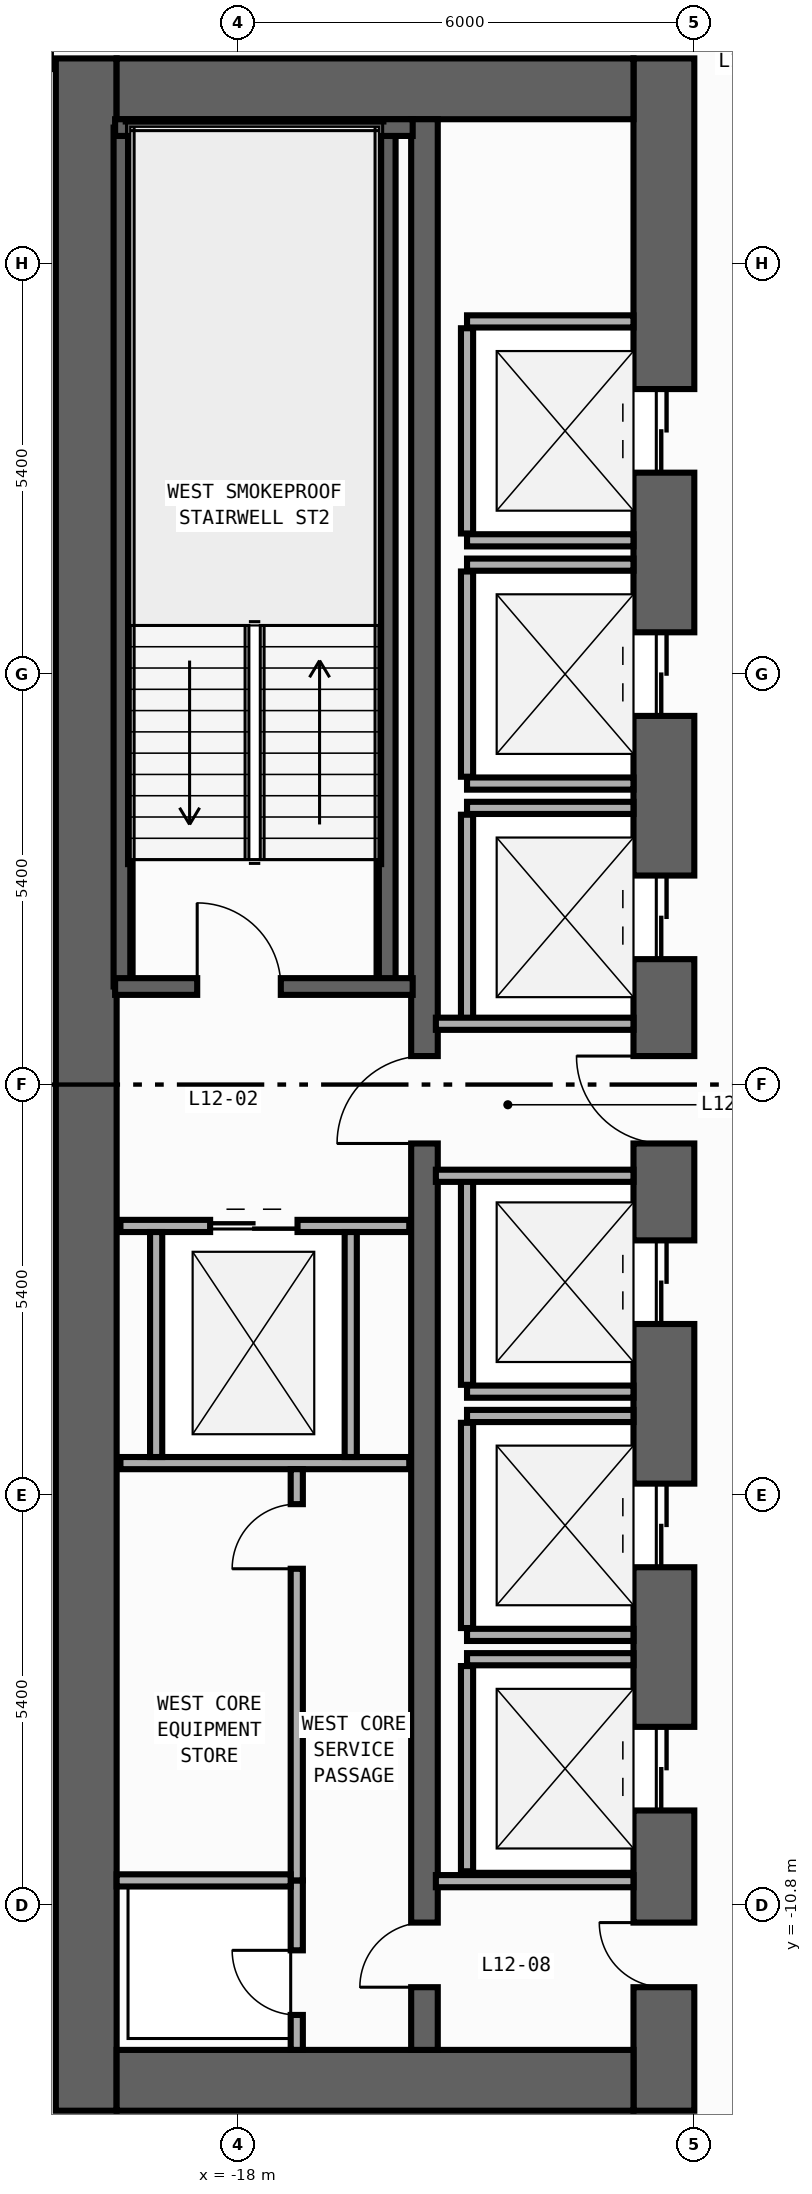
"""IFC4 building model, lengths in metres.
Left out: names, types, materials, properties, quantities, classifications, styles, units other than length and angle.
Written with IfcOpenShell. Run it as: python <this file> out.ifc"""

import sys

from ifc_helpers import new_model, si_unit, direction, frame, frame_2d, origin, place, context, subcontext, project, spatial, rectangle, extrude, element, fill, save


model = new_model("IFC4")
c1 = context("Model", 3, precision=1e-05, world=origin(), true_north=direction((0.0, 1.0)))
c2 = subcontext(c1, "Body", "Model", "MODEL_VIEW")
j1 = project(units=[si_unit("LENGTHUNIT", "METRE"), si_unit("PLANEANGLEUNIT", "RADIAN")], contexts=[c1])
p1 = place(None, origin())
s1 = spatial("IfcSite", under=j1, at=p1, CompositionType="ELEMENT")
p2 = place(p1, origin())
s2 = spatial("IfcBuilding", under=s1, at=p2, CompositionType="ELEMENT")
p3 = place(p2, frame((0.0, 0.0, 51.2)))
s3 = spatial("IfcBuildingStorey", under=s2, at=p3, CompositionType="ELEMENT", Elevation=51.2)
p4 = place(p3, frame((-20.0, -13.5, 0.0), z_axis=(0.0, 0.0, 1.0), x_axis=(0.0, 1.0, 0.0)))
e1 = element("IfcWall", 1, at=p4, inside=s3, PredefinedType="SHEAR", context=c2, shape_type="SweptSolid", body=[
    extrude(rectangle(XDim=27.0, YDim=0.8, at=frame_2d((13.5, 0.0))), origin(), (0.0, 0.0, 1.0), 3.94),
])
p5 = place(p3, frame((-12.4, -13.5, 0.0), z_axis=(0.0, 0.0, 1.0), x_axis=(0.0, 1.0, 0.0)))
e2 = element("IfcWall", 2, at=p5, inside=s3, PredefinedType="SHEAR", context=c2, shape_type="SweptSolid", body=[
    extrude(rectangle(XDim=27.0, YDim=0.8, at=frame_2d((13.5, 0.0))), origin(), (0.0, 0.0, 1.0), 3.94),
])
p6 = place(p5, frame((21.55, 0.0, 0.0)))
e3 = element("IfcOpeningElement", 3, at=p6, cuts=e2, PredefinedType="OPENING", context=c2, shape_type="SweptSolid", body=[
    extrude(rectangle(XDim=1.1, YDim=2.2, at=frame_2d((0.55, 1.1))), frame((0.0, 0.41, 0.0), z_axis=(0.0, -1.0, 0.0), x_axis=(1.0, 0.0, 0.0)), (0.0, 0.0, 1.0), 0.82),
])
p7 = place(p5, frame((18.35, 0.0, 0.0)))
e4 = element("IfcOpeningElement", 4, at=p7, cuts=e2, PredefinedType="OPENING", context=c2, shape_type="SweptSolid", body=[
    extrude(rectangle(XDim=1.1, YDim=2.2, at=frame_2d((0.55, 1.1))), frame((0.0, 0.41, 0.0), z_axis=(0.0, -1.0, 0.0), x_axis=(1.0, 0.0, 0.0)), (0.0, 0.0, 1.0), 0.82),
])
p8 = place(p5, frame((15.15, 0.0, 0.0)))
e5 = element("IfcOpeningElement", 5, at=p8, cuts=e2, PredefinedType="OPENING", context=c2, shape_type="SweptSolid", body=[
    extrude(rectangle(XDim=1.1, YDim=2.2, at=frame_2d((0.55, 1.1))), frame((0.0, 0.41, 0.0), z_axis=(0.0, -1.0, 0.0), x_axis=(1.0, 0.0, 0.0)), (0.0, 0.0, 1.0), 0.82),
])
p9 = place(p5, frame((10.35, 0.0, 0.0)))
e6 = element("IfcOpeningElement", 6, at=p9, cuts=e2, PredefinedType="OPENING", context=c2, shape_type="SweptSolid", body=[
    extrude(rectangle(XDim=1.1, YDim=2.2, at=frame_2d((0.55, 1.1))), frame((0.0, 0.41, 0.0), z_axis=(0.0, -1.0, 0.0), x_axis=(1.0, 0.0, 0.0)), (0.0, 0.0, 1.0), 0.82),
])
p10 = place(p5, frame((7.15, 0.0, 0.0)))
e7 = element("IfcOpeningElement", 7, at=p10, cuts=e2, PredefinedType="OPENING", context=c2, shape_type="SweptSolid", body=[
    extrude(rectangle(XDim=1.1, YDim=2.2, at=frame_2d((0.55, 1.1))), frame((0.0, 0.41, 0.0), z_axis=(0.0, -1.0, 0.0), x_axis=(1.0, 0.0, 0.0)), (0.0, 0.0, 1.0), 0.82),
])
p11 = place(p5, frame((3.95, 0.0, 0.0)))
e8 = element("IfcOpeningElement", 8, at=p11, cuts=e2, PredefinedType="OPENING", context=c2, shape_type="SweptSolid", body=[
    extrude(rectangle(XDim=1.1, YDim=2.2, at=frame_2d((0.55, 1.1))), frame((0.0, 0.41, 0.0), z_axis=(0.0, -1.0, 0.0), x_axis=(1.0, 0.0, 0.0)), (0.0, 0.0, 1.0), 0.82),
])
p12 = place(p5, frame((12.725, 0.0, 0.0)))
e9 = element("IfcOpeningElement", 9, at=p12, cuts=e2, PredefinedType="OPENING", context=c2, shape_type="SweptSolid", body=[
    extrude(rectangle(XDim=1.15, YDim=2.2, at=frame_2d((0.575, 1.1))), frame((0.0, 0.41, 0.0), z_axis=(0.0, -1.0, 0.0), x_axis=(1.0, 0.0, 0.0)), (0.0, 0.0, 1.0), 0.82),
])
p13 = place(p5, frame((1.625, 0.0, 0.0)))
e10 = element("IfcOpeningElement", 10, at=p13, cuts=e2, PredefinedType="OPENING", context=c2, shape_type="SweptSolid", body=[
    extrude(rectangle(XDim=0.85, YDim=2.1, at=frame_2d((0.425, 1.05))), frame((0.0, 0.41, 0.0), z_axis=(0.0, -1.0, 0.0), x_axis=(1.0, 0.0, 0.0)), (0.0, 0.0, 1.0), 0.82),
])
for number, where, z_axis, x_axis in (
    (11, (-19.6, -13.1, 0.0), (0.0, 0.0, 1.0), (1.0, 0.0, 0.0)),
    (12, (-19.6, 13.1, 0.0), (0.0, 0.0, 1.0), (1.0, 0.0, 0.0)),
):
    element("IfcWall", number, at=place(p3, frame(where, z_axis=z_axis, x_axis=x_axis)), inside=s3, PredefinedType="SHEAR", context=c2, shape_type="SweptSolid", body=[
        extrude(rectangle(XDim=6.8, YDim=0.8, at=frame_2d((3.4, 0.0))), origin(), (0.0, 0.0, 1.0), 3.94),
    ])
p14 = place(p3, frame((-15.55, -12.7, 0.0), z_axis=(0.0, 0.0, 1.0), x_axis=(0.0, 1.0, 0.0)))
e13 = element("IfcWall", 13, at=p14, inside=s3, PredefinedType="SHEAR", context=c2, shape_type="SweptSolid", body=[
    extrude(rectangle(XDim=25.4, YDim=0.35, at=frame_2d((12.7, 0.0))), origin(), (0.0, 0.0, 1.0), 3.94),
])
p15 = place(p14, frame((11.925, 0.0, 0.0)))
e14 = element("IfcOpeningElement", 14, at=p15, cuts=e13, PredefinedType="OPENING", context=c2, shape_type="SweptSolid", body=[
    extrude(rectangle(XDim=1.15, YDim=2.2, at=frame_2d((0.575, 1.1))), frame((0.0, 0.185, 0.0), z_axis=(0.0, -1.0, 0.0), x_axis=(1.0, 0.0, 0.0)), (0.0, 0.0, 1.0), 0.37),
])
p16 = place(p14, frame((0.825, 0.0, 0.0)))
e15 = element("IfcOpeningElement", 15, at=p16, cuts=e13, PredefinedType="OPENING", context=c2, shape_type="SweptSolid", body=[
    extrude(rectangle(XDim=0.85, YDim=2.1, at=frame_2d((0.425, 1.05))), frame((0.0, 0.185, 0.0), z_axis=(0.0, -1.0, 0.0), x_axis=(1.0, 0.0, 0.0)), (0.0, 0.0, 1.0), 0.37),
])
for number, where, z_axis, x_axis in (
    (16, (-16.04, 1.29, 0.0), (0.0, 0.0, 1.0), (0.0, 1.0, 0.0)),
    (17, (-19.53, 1.29, 0.0), (0.0, 0.0, 1.0), (0.0, 1.0, 0.0)),
):
    element("IfcWall", number, at=place(p3, frame(where, z_axis=z_axis, x_axis=x_axis)), inside=s3, PredefinedType="SHEAR", context=c2, shape_type="SweptSolid", body=[
        extrude(rectangle(XDim=11.3, YDim=0.22, at=frame_2d((5.65, 0.0))), origin(), (0.0, 0.0, 1.0), 3.94),
    ])
p17 = place(p3, frame((-19.62, 12.59, 0.0), z_axis=(0.0, 0.0, 1.0), x_axis=(1.0, 0.0, 0.0)))
e18 = element("IfcWall", 18, at=p17, inside=s3, PredefinedType="SHEAR", context=c2, shape_type="SweptSolid", body=[
    extrude(rectangle(XDim=3.915, YDim=0.22, at=frame_2d((1.958, 0.0))), origin(), (0.0, 0.0, 1.0), 3.94),
])
p18 = place(p3, frame((-19.62, 1.29, 0.0), z_axis=(0.0, 0.0, 1.0), x_axis=(1.0, 0.0, 0.0)))
e19 = element("IfcWall", 19, at=p18, inside=s3, PredefinedType="SHEAR", context=c2, shape_type="SweptSolid", body=[
    extrude(rectangle(XDim=3.915, YDim=0.22, at=frame_2d((1.958, 0.0))), origin(), (0.0, 0.0, 1.0), 3.94),
])
p19 = place(p18, frame((1.08, 0.0, 0.0)))
e20 = element("IfcOpeningElement", 20, at=p19, cuts=e19, PredefinedType="OPENING", context=c2, shape_type="SweptSolid", body=[
    extrude(rectangle(XDim=1.1, YDim=2.2, at=frame_2d((0.55, 1.1))), frame((0.0, 0.12, 0.0), z_axis=(0.0, -1.0, 0.0), x_axis=(1.0, 0.0, 0.0)), (0.0, 0.0, 1.0), 0.24),
])
for number, where, z_axis, x_axis in (
    (21, (-14.99, 7.16, 0.0), (0.0, 0.0, 1.0), (1.0, 0.0, 0.0)),
    (22, (-14.99, 10.04, 0.0), (0.0, 0.0, 1.0), (1.0, 0.0, 0.0)),
):
    element("IfcWall", number, at=place(p3, frame(where, z_axis=z_axis, x_axis=x_axis)), inside=s3, PredefinedType="STANDARD", context=c2, shape_type="SweptSolid", body=[
        extrude(rectangle(XDim=2.19, YDim=0.16, at=frame_2d((1.095, 0.0))), origin(), (0.0, 0.0, 1.0), 3.94),
    ])
p20 = place(p3, frame((-14.99, 7.25, 0.0), z_axis=(0.0, 0.0, 1.0), x_axis=(0.0, 1.0, 0.0)))
e23 = element("IfcWall", 23, at=p20, inside=s3, PredefinedType="STANDARD", context=c2, shape_type="SweptSolid", body=[
    extrude(rectangle(XDim=2.7, YDim=0.16, at=frame_2d((1.35, 0.0))), origin(), (0.0, 0.0, 1.0), 3.94),
])
for number, where, z_axis, x_axis in (
    (24, (-14.99, 3.96, 0.0), (0.0, 0.0, 1.0), (1.0, 0.0, 0.0)),
    (25, (-14.99, 6.84, 0.0), (0.0, 0.0, 1.0), (1.0, 0.0, 0.0)),
):
    element("IfcWall", number, at=place(p3, frame(where, z_axis=z_axis, x_axis=x_axis)), inside=s3, PredefinedType="STANDARD", context=c2, shape_type="SweptSolid", body=[
        extrude(rectangle(XDim=2.19, YDim=0.16, at=frame_2d((1.095, 0.0))), origin(), (0.0, 0.0, 1.0), 3.94),
    ])
p21 = place(p3, frame((-14.99, 4.05, 0.0), z_axis=(0.0, 0.0, 1.0), x_axis=(0.0, 1.0, 0.0)))
e26 = element("IfcWall", 26, at=p21, inside=s3, PredefinedType="STANDARD", context=c2, shape_type="SweptSolid", body=[
    extrude(rectangle(XDim=2.7, YDim=0.16, at=frame_2d((1.35, 0.0))), origin(), (0.0, 0.0, 1.0), 3.94),
])
p22 = place(p3, frame((-14.99, 3.64, 0.0), z_axis=(0.0, 0.0, 1.0), x_axis=(1.0, 0.0, 0.0)))
e27 = element("IfcWall", 27, at=p22, inside=s3, PredefinedType="STANDARD", context=c2, shape_type="SweptSolid", body=[
    extrude(rectangle(XDim=2.19, YDim=0.16, at=frame_2d((1.095, 0.0))), origin(), (0.0, 0.0, 1.0), 3.94),
])
p23 = place(p3, frame((-14.99, 0.85, 0.0), z_axis=(0.0, 0.0, 1.0), x_axis=(0.0, 1.0, 0.0)))
e28 = element("IfcWall", 28, at=p23, inside=s3, PredefinedType="STANDARD", context=c2, shape_type="SweptSolid", body=[
    extrude(rectangle(XDim=2.7, YDim=0.16, at=frame_2d((1.35, 0.0))), origin(), (0.0, 0.0, 1.0), 3.94),
])
p24 = place(p3, frame((-14.99, -4.04, 0.0), z_axis=(0.0, 0.0, 1.0), x_axis=(1.0, 0.0, 0.0)))
e29 = element("IfcWall", 29, at=p24, inside=s3, PredefinedType="STANDARD", context=c2, shape_type="SweptSolid", body=[
    extrude(rectangle(XDim=2.19, YDim=0.16, at=frame_2d((1.095, 0.0))), origin(), (0.0, 0.0, 1.0), 3.94),
])
p25 = place(p3, frame((-14.99, -3.95, 0.0), z_axis=(0.0, 0.0, 1.0), x_axis=(0.0, 1.0, 0.0)))
e30 = element("IfcWall", 30, at=p25, inside=s3, PredefinedType="STANDARD", context=c2, shape_type="SweptSolid", body=[
    extrude(rectangle(XDim=2.7, YDim=0.16, at=frame_2d((1.35, 0.0))), origin(), (0.0, 0.0, 1.0), 3.94),
])
for number, where, z_axis, x_axis in (
    (31, (-14.99, -7.24, 0.0), (0.0, 0.0, 1.0), (1.0, 0.0, 0.0)),
    (32, (-14.99, -4.36, 0.0), (0.0, 0.0, 1.0), (1.0, 0.0, 0.0)),
):
    element("IfcWall", number, at=place(p3, frame(where, z_axis=z_axis, x_axis=x_axis)), inside=s3, PredefinedType="STANDARD", context=c2, shape_type="SweptSolid", body=[
        extrude(rectangle(XDim=2.19, YDim=0.16, at=frame_2d((1.095, 0.0))), origin(), (0.0, 0.0, 1.0), 3.94),
    ])
p26 = place(p3, frame((-14.99, -7.15, 0.0), z_axis=(0.0, 0.0, 1.0), x_axis=(0.0, 1.0, 0.0)))
e33 = element("IfcWall", 33, at=p26, inside=s3, PredefinedType="STANDARD", context=c2, shape_type="SweptSolid", body=[
    extrude(rectangle(XDim=2.7, YDim=0.16, at=frame_2d((1.35, 0.0))), origin(), (0.0, 0.0, 1.0), 3.94),
])
p27 = place(p3, frame((-14.99, -7.56, 0.0), z_axis=(0.0, 0.0, 1.0), x_axis=(1.0, 0.0, 0.0)))
e34 = element("IfcWall", 34, at=p27, inside=s3, PredefinedType="STANDARD", context=c2, shape_type="SweptSolid", body=[
    extrude(rectangle(XDim=2.19, YDim=0.16, at=frame_2d((1.095, 0.0))), origin(), (0.0, 0.0, 1.0), 3.94),
])
p28 = place(p3, frame((-14.99, -10.35, 0.0), z_axis=(0.0, 0.0, 1.0), x_axis=(0.0, 1.0, 0.0)))
e35 = element("IfcWall", 35, at=p28, inside=s3, PredefinedType="STANDARD", context=c2, shape_type="SweptSolid", body=[
    extrude(rectangle(XDim=2.7, YDim=0.16, at=frame_2d((1.35, 0.0))), origin(), (0.0, 0.0, 1.0), 3.94),
])
p29 = place(p3, frame((-19.55, -1.86, 0.0), z_axis=(0.0, 0.0, 1.0), x_axis=(1.0, 0.0, 0.0)))
e36 = element("IfcWall", 36, at=p29, inside=s3, PredefinedType="STANDARD", context=c2, shape_type="SweptSolid", body=[
    extrude(rectangle(XDim=3.8, YDim=0.16, at=frame_2d((1.9, 0.0))), origin(), (0.0, 0.0, 1.0), 3.94),
])
p30 = place(p29, frame((1.18, 0.0, 0.0)))
e37 = element("IfcOpeningElement", 37, at=p30, cuts=e36, PredefinedType="OPENING", context=c2, shape_type="SweptSolid", body=[
    extrude(rectangle(XDim=1.15, YDim=2.2, at=frame_2d((0.575, 1.1))), frame((0.0, 0.09, 0.0), z_axis=(0.0, -1.0, 0.0), x_axis=(1.0, 0.0, 0.0)), (0.0, 0.0, 1.0), 0.18),
])
p31 = place(p3, frame((-19.55, -4.98, 0.0), z_axis=(0.0, 0.0, 1.0), x_axis=(1.0, 0.0, 0.0)))
e38 = element("IfcWall", 38, at=p31, inside=s3, PredefinedType="STANDARD", context=c2, shape_type="SweptSolid", body=[
    extrude(rectangle(XDim=3.8, YDim=0.16, at=frame_2d((1.9, 0.0))), origin(), (0.0, 0.0, 1.0), 3.94),
])
for number, where, z_axis, x_axis in (
    (39, (-19.08, -4.9, 0.0), (0.0, 0.0, 1.0), (0.0, 1.0, 0.0)),
    (40, (-16.52, -4.9, 0.0), (0.0, 0.0, 1.0), (0.0, 1.0, 0.0)),
):
    element("IfcWall", number, at=place(p3, frame(where, z_axis=z_axis, x_axis=x_axis)), inside=s3, PredefinedType="STANDARD", context=c2, shape_type="SweptSolid", body=[
        extrude(rectangle(XDim=2.96, YDim=0.16, at=frame_2d((1.48, 0.0))), origin(), (0.0, 0.0, 1.0), 3.94),
    ])
for number, where, z_axis, x_axis in (
    (41, (-15.4, 0.8, 0.0), (0.0, 0.0, 1.0), (1.0, 0.0, 0.0)),
    (42, (-15.4, -1.2, 0.0), (0.0, 0.0, 1.0), (1.0, 0.0, 0.0)),
    (43, (-15.4, -10.48, 0.0), (0.0, 0.0, 1.0), (1.0, 0.0, 0.0)),
):
    element("IfcWall", number, at=place(p3, frame(where, z_axis=z_axis, x_axis=x_axis)), inside=s3, PredefinedType="STANDARD", context=c2, shape_type="SweptSolid", body=[
        extrude(rectangle(XDim=2.6, YDim=0.16, at=frame_2d((1.3, 0.0))), origin(), (0.0, 0.0, 1.0), 3.94),
    ])
p32 = place(p3, frame((-17.23, -12.7, 0.0), z_axis=(0.0, 0.0, 1.0), x_axis=(0.0, 1.0, 0.0)))
e44 = element("IfcWall", 44, at=p32, inside=s3, PredefinedType="PARTITIONING", context=c2, shape_type="SweptSolid", body=[
    extrude(rectangle(XDim=2.23, YDim=0.16, at=frame_2d((1.115, 0.0))), origin(), (0.0, 0.0, 1.0), 3.94),
])
p33 = place(p32, frame((0.46, 0.0, 0.0)))
e45 = element("IfcOpeningElement", 45, at=p33, cuts=e44, PredefinedType="OPENING", context=c2, shape_type="SweptSolid", body=[
    extrude(rectangle(XDim=0.85, YDim=2.1, at=frame_2d((0.425, 1.05))), frame((0.0, 0.09, 0.0), z_axis=(0.0, -1.0, 0.0), x_axis=(1.0, 0.0, 0.0)), (0.0, 0.0, 1.0), 0.18),
])
p34 = place(p3, frame((-17.23, -10.47, 0.0), z_axis=(0.0, 0.0, 1.0), x_axis=(0.0, 1.0, 0.0)))
e46 = element("IfcWall", 46, at=p34, inside=s3, PredefinedType="PARTITIONING", context=c2, shape_type="SweptSolid", body=[
    extrude(rectangle(XDim=5.41, YDim=0.16, at=frame_2d((2.705, 0.0))), origin(), (0.0, 0.0, 1.0), 3.94),
])
p35 = place(p34, frame((4.1, 0.0, 0.0)))
e47 = element("IfcOpeningElement", 47, at=p35, cuts=e46, PredefinedType="OPENING", context=c2, shape_type="SweptSolid", body=[
    extrude(rectangle(XDim=0.85, YDim=2.1, at=frame_2d((0.425, 1.05))), frame((0.0, 0.09, 0.0), z_axis=(0.0, -1.0, 0.0), x_axis=(1.0, 0.0, 0.0)), (0.0, 0.0, 1.0), 0.18),
])
p36 = place(p3, frame((-19.6, -10.47, 0.0), z_axis=(0.0, 0.0, 1.0), x_axis=(1.0, 0.0, 0.0)))
e48 = element("IfcWall", 48, at=p36, inside=s3, PredefinedType="PARTITIONING", context=c2, shape_type="SweptSolid", body=[
    extrude(rectangle(XDim=2.29, YDim=0.16, at=frame_2d((1.145, 0.0))), origin(), (0.0, 0.0, 1.0), 3.94),
])
p37 = place(p19, origin())
e49 = element("IfcDoor", 49, at=p37, inside=s3, OperationType="SINGLE_SWING_LEFT", PredefinedType="DOOR", context=c2, shape_type="SweptSolid", body=[
    extrude(rectangle(XDim=1.1, YDim=2.2, at=frame_2d((0.55, 1.1))), frame((0.0, 0.025, 0.0), z_axis=(0.0, -1.0, 0.0), x_axis=(1.0, 0.0, 0.0)), (0.0, 0.0, 1.0), 0.05),
])
fill(e20, e49)
p38 = place(p6, origin())
e50 = element("IfcDoor", 50, at=p38, inside=s3, OperationType="DOUBLE_DOOR_SLIDING", PredefinedType="DOOR", context=c2, shape_type="SweptSolid", body=[
    extrude(rectangle(XDim=1.1, YDim=2.2, at=frame_2d((0.55, 1.1))), frame((0.0, 0.025, 0.0), z_axis=(0.0, -1.0, 0.0), x_axis=(1.0, 0.0, 0.0)), (0.0, 0.0, 1.0), 0.05),
])
fill(e3, e50)
p39 = place(p7, origin())
e51 = element("IfcDoor", 51, at=p39, inside=s3, OperationType="DOUBLE_DOOR_SLIDING", PredefinedType="DOOR", context=c2, shape_type="SweptSolid", body=[
    extrude(rectangle(XDim=1.1, YDim=2.2, at=frame_2d((0.55, 1.1))), frame((0.0, 0.025, 0.0), z_axis=(0.0, -1.0, 0.0), x_axis=(1.0, 0.0, 0.0)), (0.0, 0.0, 1.0), 0.05),
])
fill(e4, e51)
p40 = place(p8, origin())
e52 = element("IfcDoor", 52, at=p40, inside=s3, OperationType="DOUBLE_DOOR_SLIDING", PredefinedType="DOOR", context=c2, shape_type="SweptSolid", body=[
    extrude(rectangle(XDim=1.1, YDim=2.2, at=frame_2d((0.55, 1.1))), frame((0.0, 0.025, 0.0), z_axis=(0.0, -1.0, 0.0), x_axis=(1.0, 0.0, 0.0)), (0.0, 0.0, 1.0), 0.05),
])
fill(e5, e52)
p41 = place(p9, origin())
e53 = element("IfcDoor", 53, at=p41, inside=s3, OperationType="DOUBLE_DOOR_SLIDING", PredefinedType="DOOR", context=c2, shape_type="SweptSolid", body=[
    extrude(rectangle(XDim=1.1, YDim=2.2, at=frame_2d((0.55, 1.1))), frame((0.0, 0.025, 0.0), z_axis=(0.0, -1.0, 0.0), x_axis=(1.0, 0.0, 0.0)), (0.0, 0.0, 1.0), 0.05),
])
fill(e6, e53)
p42 = place(p10, origin())
e54 = element("IfcDoor", 54, at=p42, inside=s3, OperationType="DOUBLE_DOOR_SLIDING", PredefinedType="DOOR", context=c2, shape_type="SweptSolid", body=[
    extrude(rectangle(XDim=1.1, YDim=2.2, at=frame_2d((0.55, 1.1))), frame((0.0, 0.025, 0.0), z_axis=(0.0, -1.0, 0.0), x_axis=(1.0, 0.0, 0.0)), (0.0, 0.0, 1.0), 0.05),
])
fill(e7, e54)
p43 = place(p11, origin())
e55 = element("IfcDoor", 55, at=p43, inside=s3, OperationType="DOUBLE_DOOR_SLIDING", PredefinedType="DOOR", context=c2, shape_type="SweptSolid", body=[
    extrude(rectangle(XDim=1.1, YDim=2.2, at=frame_2d((0.55, 1.1))), frame((0.0, 0.025, 0.0), z_axis=(0.0, -1.0, 0.0), x_axis=(1.0, 0.0, 0.0)), (0.0, 0.0, 1.0), 0.05),
])
fill(e8, e55)
p44 = place(p12, origin())
e56 = element("IfcDoor", 56, at=p44, inside=s3, OperationType="SINGLE_SWING_RIGHT", PredefinedType="DOOR", context=c2, shape_type="SweptSolid", body=[
    extrude(rectangle(XDim=1.15, YDim=2.2, at=frame_2d((0.575, 1.1))), frame((0.0, 0.025, 0.0), z_axis=(0.0, -1.0, 0.0), x_axis=(1.0, 0.0, 0.0)), (0.0, 0.0, 1.0), 0.05),
])
fill(e9, e56)
p45 = place(p15, origin())
e57 = element("IfcDoor", 57, at=p45, inside=s3, OperationType="SINGLE_SWING_LEFT", PredefinedType="DOOR", context=c2, shape_type="SweptSolid", body=[
    extrude(rectangle(XDim=1.15, YDim=2.2, at=frame_2d((0.575, 1.1))), frame((0.0, 0.025, 0.0), z_axis=(0.0, -1.0, 0.0), x_axis=(1.0, 0.0, 0.0)), (0.0, 0.0, 1.0), 0.05),
])
fill(e14, e57)
p46 = place(p13, origin())
e58 = element("IfcDoor", 58, at=p46, inside=s3, OperationType="SINGLE_SWING_RIGHT", PredefinedType="DOOR", context=c2, shape_type="SweptSolid", body=[
    extrude(rectangle(XDim=0.85, YDim=2.1, at=frame_2d((0.425, 1.05))), frame((0.0, 0.025, 0.0), z_axis=(0.0, -1.0, 0.0), x_axis=(1.0, 0.0, 0.0)), (0.0, 0.0, 1.0), 0.05),
])
fill(e10, e58)
p47 = place(p16, origin())
e59 = element("IfcDoor", 59, at=p47, inside=s3, OperationType="SINGLE_SWING_LEFT", PredefinedType="DOOR", context=c2, shape_type="SweptSolid", body=[
    extrude(rectangle(XDim=0.85, YDim=2.1, at=frame_2d((0.425, 1.05))), frame((0.0, 0.025, 0.0), z_axis=(0.0, -1.0, 0.0), x_axis=(1.0, 0.0, 0.0)), (0.0, 0.0, 1.0), 0.05),
])
fill(e15, e59)
p48 = place(p30, origin())
e60 = element("IfcDoor", 60, at=p48, inside=s3, OperationType="DOUBLE_DOOR_SLIDING", PredefinedType="DOOR", context=c2, shape_type="SweptSolid", body=[
    extrude(rectangle(XDim=1.15, YDim=2.2, at=frame_2d((0.575, 1.1))), frame((0.0, 0.025, 0.0), z_axis=(0.0, -1.0, 0.0), x_axis=(1.0, 0.0, 0.0)), (0.0, 0.0, 1.0), 0.05),
])
fill(e37, e60)
p49 = place(p33, origin())
e61 = element("IfcDoor", 61, at=p49, inside=s3, OperationType="SINGLE_SWING_RIGHT", PredefinedType="DOOR", context=c2, shape_type="SweptSolid", body=[
    extrude(rectangle(XDim=0.85, YDim=2.1, at=frame_2d((0.425, 1.05))), frame((0.0, 0.025, 0.0), z_axis=(0.0, -1.0, 0.0), x_axis=(1.0, 0.0, 0.0)), (0.0, 0.0, 1.0), 0.05),
])
fill(e45, e61)
p50 = place(p35, origin())
e62 = element("IfcDoor", 62, at=p50, inside=s3, OperationType="SINGLE_SWING_LEFT", PredefinedType="DOOR", context=c2, shape_type="SweptSolid", body=[
    extrude(rectangle(XDim=0.85, YDim=2.1, at=frame_2d((0.425, 1.05))), frame((0.0, 0.025, 0.0), z_axis=(0.0, -1.0, 0.0), x_axis=(1.0, 0.0, 0.0)), (0.0, 0.0, 1.0), 0.05),
])
fill(e47, e62)
save(model, sys.argv[1])
